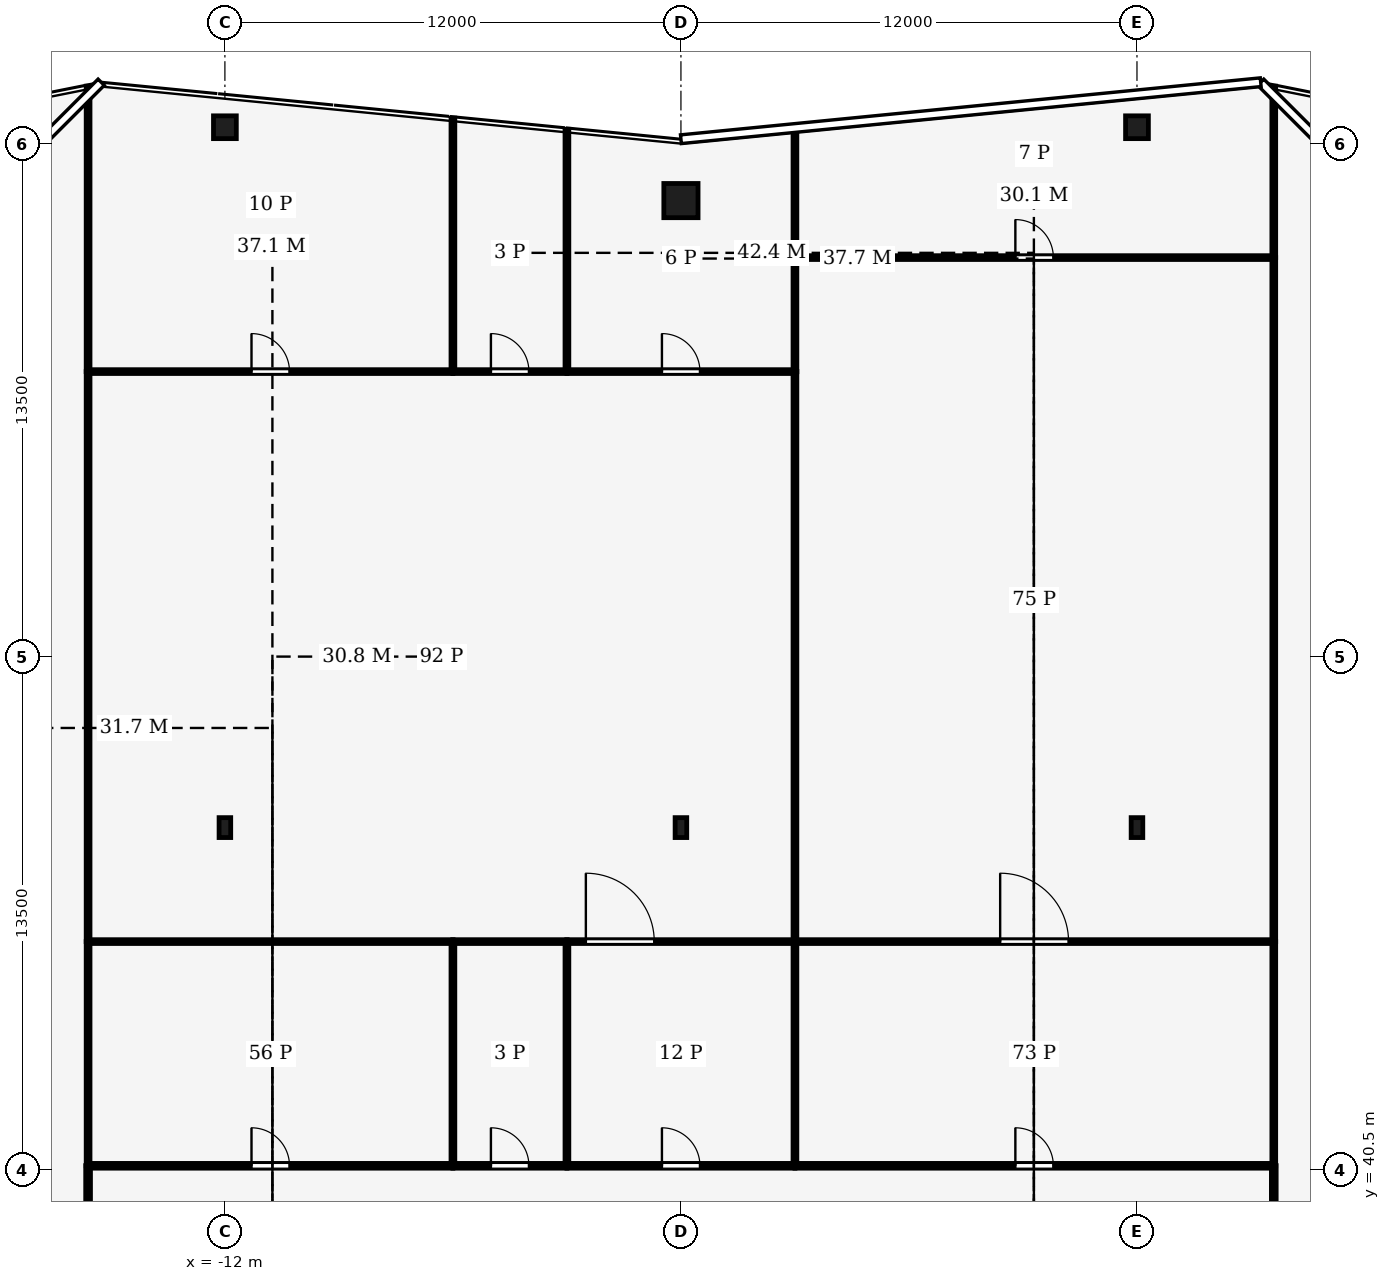
"""IFC4 building model, lengths in metres.
Left out: names, types, materials, properties, quantities, classifications, styles, units other than length and angle.
Written with IfcOpenShell. Run it as: python <this file> out.ifc"""

import sys

from ifc_helpers import new_model, si_unit, direction, frame, frame_2d, origin, origin_2d, place, context, subcontext, project, spatial, rectangle, hollow_rectangle, i_section, extrude, element, fill, save


model = new_model("IFC4")
c1 = context("Model", 3, precision=1e-05, world=origin(), true_north=direction((0.0, 1.0)))
c2 = subcontext(c1, "Body", "Model", "MODEL_VIEW")
j1 = project(units=[si_unit("LENGTHUNIT", "METRE"), si_unit("PLANEANGLEUNIT", "RADIAN")], contexts=[c1])
p1 = place(None, origin())
s1 = spatial("IfcSite", under=j1, at=p1, CompositionType="ELEMENT")
p2 = place(p1, origin())
s2 = spatial("IfcBuilding", under=s1, at=p2, CompositionType="ELEMENT")
p3 = place(p2, frame((0.0, 0.0, 334.0)))
s3 = spatial("IfcBuildingStorey", under=s2, at=p3, CompositionType="ELEMENT", Elevation=334.0)
p4 = place(p3, frame((0.0, 66.0, 0.0), z_axis=(0.0, 0.0, 1.0), x_axis=(1.0, 0.0, 0.0)))
e1 = element("IfcColumn", 1, at=p4, inside=s3, PredefinedType="COLUMN", context=c2, shape_type="SweptSolid", body=[
    extrude(hollow_rectangle(XDim=0.9, YDim=0.9, WallThickness=0.04, at=origin_2d()), origin(), (0.0, 0.0, 1.0), 6.5),
])
for number, where, z_axis, x_axis in (
    (2, (-12.0, 67.93, 0.0), (0.0, 0.0, 1.0), (1.0, 0.0, 0.0)),
    (3, (12.0, 67.93, 0.0), (0.0, 0.0, 1.0), (1.0, 0.0, 0.0)),
):
    element("IfcColumn", number, at=place(p3, frame(where, z_axis=z_axis, x_axis=x_axis)), inside=s3, PredefinedType="COLUMN", context=c2, shape_type="SweptSolid", body=[
        extrude(hollow_rectangle(XDim=0.6, YDim=0.6, WallThickness=0.025, at=origin_2d()), origin(), (0.0, 0.0, 1.0), 6.5),
    ])
for number, where, z_axis, x_axis in (
    (4, (-12.0, 49.5, 0.0), (0.0, 0.0, 1.0), (1.0, 0.0, 0.0)),
    (5, (0.0, 49.5, 0.0), (0.0, 0.0, 1.0), (1.0, 0.0, 0.0)),
    (6, (12.0, 49.5, 0.0), (0.0, 0.0, 1.0), (1.0, 0.0, 0.0)),
):
    element("IfcColumn", number, at=place(p3, frame(where, z_axis=z_axis, x_axis=x_axis)), inside=s3, PredefinedType="COLUMN", context=c2, shape_type="SweptSolid", body=[
        extrude(i_section(OverallWidth=0.306, OverallDepth=0.524, WebThickness=0.012, FlangeThickness=0.04, FilletRadius=0.027, at=origin_2d()), origin(), (0.0, 0.0, 1.0), 6.5),
    ])
p5 = place(p3, frame((-15.6, 37.5, 0.0), z_axis=(0.0, 0.0, 1.0), x_axis=(0.0, 1.0, 0.0)))
e7 = element("IfcWall", 7, at=p5, inside=s3, PredefinedType="PARTITIONING", context=c2, shape_type="SweptSolid", body=[
    extrude(rectangle(XDim=3.104, YDim=0.125, at=frame_2d((1.552, 0.0))), origin(), (0.0, 0.0, 1.0), 5.62),
])
p6 = place(p5, frame((0.252, 0.0, 0.0)))
e8 = element("IfcOpeningElement", 8, at=p6, cuts=e7, PredefinedType="OPENING", context=c2, shape_type="SweptSolid", body=[
    extrude(rectangle(XDim=1.0, YDim=2.1, at=frame_2d((0.5, 1.05))), frame((0.0, 0.073, 0.0), z_axis=(0.0, -1.0, 0.0), x_axis=(1.0, 0.0, 0.0)), (0.0, 0.0, 1.0), 0.145),
])
p7 = place(p3, frame((15.6, 40.604, 0.0), z_axis=(0.0, 0.0, 1.0), x_axis=(0.0, -1.0, 0.0)))
e9 = element("IfcWall", 9, at=p7, inside=s3, PredefinedType="PARTITIONING", context=c2, shape_type="SweptSolid", body=[
    extrude(rectangle(XDim=6.104, YDim=0.125, at=frame_2d((3.052, 0.0))), origin(), (0.0, 0.0, 1.0), 5.62),
])
p8 = place(p7, frame((2.552, 0.0, 0.0)))
e10 = element("IfcOpeningElement", 10, at=p8, cuts=e9, PredefinedType="OPENING", context=c2, shape_type="SweptSolid", body=[
    extrude(rectangle(XDim=1.0, YDim=2.1, at=frame_2d((0.5, 1.05))), frame((0.0, 0.073, 0.0), z_axis=(0.0, -1.0, 0.0), x_axis=(1.0, 0.0, 0.0)), (0.0, 0.0, 1.0), 0.145),
])
p9 = place(p3, frame((-15.6, 40.6, 0.0), z_axis=(0.0, 0.0, 1.0), x_axis=(1.0, 0.0, 0.0)))
e11 = element("IfcWall", 11, at=p9, inside=s3, PredefinedType="PARTITIONING", context=c2, shape_type="SweptSolid", body=[
    extrude(rectangle(XDim=9.6, YDim=0.125, at=frame_2d((4.8, 0.0))), origin(), (0.0, 0.0, 1.0), 5.87),
])
p10 = place(p9, frame((4.3, 0.0, 0.0)))
e12 = element("IfcOpeningElement", 12, at=p10, cuts=e11, PredefinedType="OPENING", context=c2, shape_type="SweptSolid", body=[
    extrude(rectangle(XDim=1.0, YDim=2.1, at=frame_2d((0.5, 1.05))), frame((0.0, 0.073, 0.0), z_axis=(0.0, -1.0, 0.0), x_axis=(1.0, 0.0, 0.0)), (0.0, 0.0, 1.0), 0.145),
])
p11 = place(p3, frame((-6.0, 40.6, 0.0), z_axis=(0.0, 0.0, 1.0), x_axis=(1.0, 0.0, 0.0)))
e13 = element("IfcWall", 13, at=p11, inside=s3, PredefinedType="PARTITIONING", context=c2, shape_type="SweptSolid", body=[
    extrude(rectangle(XDim=3.0, YDim=0.125, at=frame_2d((1.5, 0.0))), origin(), (0.0, 0.0, 1.0), 5.87),
])
p12 = place(p11, frame((1.0, 0.0, 0.0)))
e14 = element("IfcOpeningElement", 14, at=p12, cuts=e13, PredefinedType="OPENING", context=c2, shape_type="SweptSolid", body=[
    extrude(rectangle(XDim=1.0, YDim=2.1, at=frame_2d((0.5, 1.05))), frame((0.0, 0.073, 0.0), z_axis=(0.0, -1.0, 0.0), x_axis=(1.0, 0.0, 0.0)), (0.0, 0.0, 1.0), 0.145),
])
p13 = place(p3, frame((-3.0, 40.6, 0.0), z_axis=(0.0, 0.0, 1.0), x_axis=(1.0, 0.0, 0.0)))
e15 = element("IfcWall", 15, at=p13, inside=s3, PredefinedType="PARTITIONING", context=c2, shape_type="SweptSolid", body=[
    extrude(rectangle(XDim=6.0, YDim=0.125, at=frame_2d((3.0, 0.0))), origin(), (0.0, 0.0, 1.0), 5.87),
])
p14 = place(p13, frame((2.5, 0.0, 0.0)))
e16 = element("IfcOpeningElement", 16, at=p14, cuts=e15, PredefinedType="OPENING", context=c2, shape_type="SweptSolid", body=[
    extrude(rectangle(XDim=1.0, YDim=2.1, at=frame_2d((0.5, 1.05))), frame((0.0, 0.073, 0.0), z_axis=(0.0, -1.0, 0.0), x_axis=(1.0, 0.0, 0.0)), (0.0, 0.0, 1.0), 0.145),
])
p15 = place(p3, frame((3.0, 40.6, 0.0), z_axis=(0.0, 0.0, 1.0), x_axis=(1.0, 0.0, 0.0)))
e17 = element("IfcWall", 17, at=p15, inside=s3, PredefinedType="PARTITIONING", context=c2, shape_type="SweptSolid", body=[
    extrude(rectangle(XDim=12.6, YDim=0.125, at=frame_2d((6.3, 0.0))), origin(), (0.0, 0.0, 1.0), 5.87),
])
p16 = place(p15, frame((5.8, 0.0, 0.0)))
e18 = element("IfcOpeningElement", 18, at=p16, cuts=e17, PredefinedType="OPENING", context=c2, shape_type="SweptSolid", body=[
    extrude(rectangle(XDim=1.0, YDim=2.1, at=frame_2d((0.5, 1.05))), frame((0.0, 0.073, 0.0), z_axis=(0.0, -1.0, 0.0), x_axis=(1.0, 0.0, 0.0)), (0.0, 0.0, 1.0), 0.145),
])
p17 = place(p3, frame((-15.6, 40.6, 0.0), z_axis=(0.0, 0.0, 1.0), x_axis=(0.0, 1.0, 0.0)))
e19 = element("IfcWall", 19, at=p17, inside=s3, PredefinedType="PARTITIONING", context=c2, shape_type="SweptSolid", body=[
    extrude(rectangle(XDim=5.9, YDim=0.1, at=frame_2d((2.95, 0.0))), origin(), (0.0, 0.0, 1.0), 6.35),
])
p18 = place(p3, frame((-15.6, 46.5, 0.0), z_axis=(0.0, 0.0, 1.0), x_axis=(0.0, 1.0, 0.0)))
e20 = element("IfcWall", 20, at=p18, inside=s3, PredefinedType="PARTITIONING", context=c2, shape_type="SweptSolid", body=[
    extrude(rectangle(XDim=15.0, YDim=0.1, at=frame_2d((7.5, 0.0))), origin(), (0.0, 0.0, 1.0), 5.83),
])
p19 = place(p3, frame((-15.6, 61.5, 0.0), z_axis=(0.0, 0.0, 1.0), x_axis=(0.0, 1.0, 0.0)))
e21 = element("IfcWall", 21, at=p19, inside=s3, PredefinedType="PARTITIONING", context=c2, shape_type="SweptSolid", body=[
    extrude(rectangle(XDim=7.51, YDim=0.1, at=frame_2d((3.755, 0.0))), origin(), (0.0, 0.0, 1.0), 5.41),
])
p20 = place(p3, frame((15.6, 46.5, 0.0), z_axis=(0.0, 0.0, 1.0), x_axis=(0.0, -1.0, 0.0)))
e22 = element("IfcWall", 22, at=p20, inside=s3, PredefinedType="PARTITIONING", context=c2, shape_type="SweptSolid", body=[
    extrude(rectangle(XDim=5.9, YDim=0.1, at=frame_2d((2.95, 0.0))), origin(), (0.0, 0.0, 1.0), 6.35),
])
p21 = place(p3, frame((15.6, 64.5, 0.0), z_axis=(0.0, 0.0, 1.0), x_axis=(0.0, -1.0, 0.0)))
e23 = element("IfcWall", 23, at=p21, inside=s3, PredefinedType="PARTITIONING", context=c2, shape_type="SweptSolid", body=[
    extrude(rectangle(XDim=18.0, YDim=0.1, at=frame_2d((9.0, 0.0))), origin(), (0.0, 0.0, 1.0), 5.83),
])
p22 = place(p3, frame((15.6, 69.01, 0.0), z_axis=(0.0, 0.0, 1.0), x_axis=(0.0, -1.0, 0.0)))
e24 = element("IfcWall", 24, at=p22, inside=s3, PredefinedType="PARTITIONING", context=c2, shape_type="SweptSolid", body=[
    extrude(rectangle(XDim=4.51, YDim=0.1, at=frame_2d((2.255, 0.0))), origin(), (0.0, 0.0, 1.0), 5.41),
])
p23 = place(p3, frame((-6.0, 40.6, 0.0), z_axis=(0.0, 0.0, 1.0), x_axis=(0.0, 1.0, 0.0)))
e25 = element("IfcWall", 25, at=p23, inside=s3, PredefinedType="PARTITIONING", context=c2, shape_type="SweptSolid", body=[
    extrude(rectangle(XDim=5.9, YDim=0.1, at=frame_2d((2.95, 0.0))), origin(), (0.0, 0.0, 1.0), 6.35),
])
p24 = place(p3, frame((-5.996, 46.5, 0.0), z_axis=(0.0, 0.0, 1.0), x_axis=(-1.0, 0.0, 0.0)))
e26 = element("IfcWall", 26, at=p24, inside=s3, PredefinedType="PARTITIONING", context=c2, shape_type="SweptSolid", body=[
    extrude(rectangle(XDim=9.604, YDim=0.1, at=frame_2d((4.802, 0.0))), origin(), (0.0, 0.0, 1.0), 5.87),
])
p25 = place(p3, frame((-3.0, 40.6, 0.0), z_axis=(0.0, 0.0, 1.0), x_axis=(0.0, 1.0, 0.0)))
e27 = element("IfcWall", 27, at=p25, inside=s3, PredefinedType="PARTITIONING", context=c2, shape_type="SweptSolid", body=[
    extrude(rectangle(XDim=5.9, YDim=0.1, at=frame_2d((2.95, 0.0))), origin(), (0.0, 0.0, 1.0), 6.35),
])
p26 = place(p3, frame((-2.996, 46.5, 0.0), z_axis=(0.0, 0.0, 1.0), x_axis=(-1.0, 0.0, 0.0)))
e28 = element("IfcWall", 28, at=p26, inside=s3, PredefinedType="PARTITIONING", context=c2, shape_type="SweptSolid", body=[
    extrude(rectangle(XDim=3.008, YDim=0.1, at=frame_2d((1.504, 0.0))), origin(), (0.0, 0.0, 1.0), 5.87),
])
p27 = place(p3, frame((-3.004, 46.5, 0.0), z_axis=(0.0, 0.0, 1.0), x_axis=(1.0, 0.0, 0.0)))
e29 = element("IfcWall", 29, at=p27, inside=s3, PredefinedType="PARTITIONING", context=c2, shape_type="SweptSolid", body=[
    extrude(rectangle(XDim=6.004, YDim=0.1, at=frame_2d((3.002, 0.0))), origin(), (0.0, 0.0, 1.0), 5.87),
])
p28 = place(p27, frame((0.502, 0.0, 0.0)))
e30 = element("IfcOpeningElement", 30, at=p28, cuts=e29, PredefinedType="OPENING", context=c2, shape_type="SweptSolid", body=[
    extrude(rectangle(XDim=1.8, YDim=2.1, at=frame_2d((0.9, 1.05))), frame((0.0, 0.06, 0.0), z_axis=(0.0, -1.0, 0.0), x_axis=(1.0, 0.0, 0.0)), (0.0, 0.0, 1.0), 0.12),
])
p29 = place(p3, frame((3.0, 40.6, 0.0), z_axis=(0.0, 0.0, 1.0), x_axis=(0.0, 1.0, 0.0)))
e31 = element("IfcWall", 31, at=p29, inside=s3, PredefinedType="PARTITIONING", context=c2, shape_type="SweptSolid", body=[
    extrude(rectangle(XDim=5.9, YDim=0.1, at=frame_2d((2.95, 0.0))), origin(), (0.0, 0.0, 1.0), 6.35),
])
p30 = place(p3, frame((-15.6, 61.5, 0.0), z_axis=(0.0, 0.0, 1.0), x_axis=(1.0, 0.0, 0.0)))
e32 = element("IfcWall", 32, at=p30, inside=s3, PredefinedType="PARTITIONING", context=c2, shape_type="SweptSolid", body=[
    extrude(rectangle(XDim=9.6, YDim=0.1, at=frame_2d((4.8, 0.0))), origin(), (0.0, 0.0, 1.0), 5.72),
])
p31 = place(p30, frame((4.3, 0.0, 0.0)))
e33 = element("IfcOpeningElement", 33, at=p31, cuts=e32, PredefinedType="OPENING", context=c2, shape_type="SweptSolid", body=[
    extrude(rectangle(XDim=1.0, YDim=2.1, at=frame_2d((0.5, 1.05))), frame((0.0, 0.06, 0.0), z_axis=(0.0, -1.0, 0.0), x_axis=(1.0, 0.0, 0.0)), (0.0, 0.0, 1.0), 0.12),
])
p32 = place(p3, frame((-6.0, 61.5, 0.0), z_axis=(0.0, 0.0, 1.0), x_axis=(1.0, 0.0, 0.0)))
e34 = element("IfcWall", 34, at=p32, inside=s3, PredefinedType="PARTITIONING", context=c2, shape_type="SweptSolid", body=[
    extrude(rectangle(XDim=3.0, YDim=0.1, at=frame_2d((1.5, 0.0))), origin(), (0.0, 0.0, 1.0), 5.72),
])
p33 = place(p32, frame((1.0, 0.0, 0.0)))
e35 = element("IfcOpeningElement", 35, at=p33, cuts=e34, PredefinedType="OPENING", context=c2, shape_type="SweptSolid", body=[
    extrude(rectangle(XDim=1.0, YDim=2.1, at=frame_2d((0.5, 1.05))), frame((0.0, 0.06, 0.0), z_axis=(0.0, -1.0, 0.0), x_axis=(1.0, 0.0, 0.0)), (0.0, 0.0, 1.0), 0.12),
])
p34 = place(p3, frame((-3.0, 61.5, 0.0), z_axis=(0.0, 0.0, 1.0), x_axis=(1.0, 0.0, 0.0)))
e36 = element("IfcWall", 36, at=p34, inside=s3, PredefinedType="PARTITIONING", context=c2, shape_type="SweptSolid", body=[
    extrude(rectangle(XDim=6.0, YDim=0.1, at=frame_2d((3.0, 0.0))), origin(), (0.0, 0.0, 1.0), 5.77),
])
p35 = place(p34, frame((2.5, 0.0, 0.0)))
e37 = element("IfcOpeningElement", 37, at=p35, cuts=e36, PredefinedType="OPENING", context=c2, shape_type="SweptSolid", body=[
    extrude(rectangle(XDim=1.0, YDim=2.1, at=frame_2d((0.5, 1.05))), frame((0.0, 0.06, 0.0), z_axis=(0.0, -1.0, 0.0), x_axis=(1.0, 0.0, 0.0)), (0.0, 0.0, 1.0), 0.12),
])
p36 = place(p3, frame((3.0, 46.5, 0.0), z_axis=(0.0, 0.0, 1.0), x_axis=(0.0, 1.0, 0.0)))
e38 = element("IfcWall", 38, at=p36, inside=s3, PredefinedType="PARTITIONING", context=c2, shape_type="SweptSolid", body=[
    extrude(rectangle(XDim=15.004, YDim=0.1, at=frame_2d((7.502, 0.0))), origin(), (0.0, 0.0, 1.0), 5.72),
])
p37 = place(p3, frame((-6.0, 61.5, 0.0), z_axis=(0.0, 0.0, 1.0), x_axis=(0.0, 1.0, 0.0)))
e39 = element("IfcWall", 39, at=p37, inside=s3, PredefinedType="PARTITIONING", context=c2, shape_type="SweptSolid", body=[
    extrude(rectangle(XDim=6.67, YDim=0.1, at=frame_2d((3.335, 0.0))), origin(), (0.0, 0.0, 1.0), 5.52),
])
p38 = place(p3, frame((-3.0, 61.5, 0.0), z_axis=(0.0, 0.0, 1.0), x_axis=(0.0, 1.0, 0.0)))
e40 = element("IfcWall", 40, at=p38, inside=s3, PredefinedType="PARTITIONING", context=c2, shape_type="SweptSolid", body=[
    extrude(rectangle(XDim=6.375, YDim=0.1, at=frame_2d((3.188, 0.0))), origin(), (0.0, 0.0, 1.0), 5.52),
])
p39 = place(p3, frame((3.0, 61.496, 0.0), z_axis=(0.0, 0.0, 1.0), x_axis=(0.0, 1.0, 0.0)))
e41 = element("IfcWall", 41, at=p39, inside=s3, PredefinedType="PARTITIONING", context=c2, shape_type="SweptSolid", body=[
    extrude(rectangle(XDim=3.004, YDim=0.1, at=frame_2d((1.502, 0.0))), origin(), (0.0, 0.0, 1.0), 6.35),
])
p40 = place(p3, frame((3.0, 64.5, 0.0), z_axis=(0.0, 0.0, 1.0), x_axis=(0.0, 1.0, 0.0)))
e42 = element("IfcWall", 42, at=p40, inside=s3, PredefinedType="PARTITIONING", context=c2, shape_type="SweptSolid", body=[
    extrude(rectangle(XDim=3.375, YDim=0.1, at=frame_2d((1.688, 0.0))), origin(), (0.0, 0.0, 1.0), 5.52),
])
p41 = place(p3, frame((3.0, 46.5, 0.0), z_axis=(0.0, 0.0, 1.0), x_axis=(1.0, 0.0, 0.0)))
e43 = element("IfcWall", 43, at=p41, inside=s3, PredefinedType="PARTITIONING", context=c2, shape_type="SweptSolid", body=[
    extrude(rectangle(XDim=12.6, YDim=0.1, at=frame_2d((6.3, 0.0))), origin(), (0.0, 0.0, 1.0), 5.87),
])
p42 = place(p41, frame((5.4, 0.0, 0.0)))
e44 = element("IfcOpeningElement", 44, at=p42, cuts=e43, PredefinedType="OPENING", context=c2, shape_type="SweptSolid", body=[
    extrude(rectangle(XDim=1.8, YDim=2.1, at=frame_2d((0.9, 1.05))), frame((0.0, 0.06, 0.0), z_axis=(0.0, -1.0, 0.0), x_axis=(1.0, 0.0, 0.0)), (0.0, 0.0, 1.0), 0.12),
])
p43 = place(p3, frame((3.0, 64.5, 0.0), z_axis=(0.0, 0.0, 1.0), x_axis=(1.0, 0.0, 0.0)))
e45 = element("IfcWall", 45, at=p43, inside=s3, PredefinedType="PARTITIONING", context=c2, shape_type="SweptSolid", body=[
    extrude(rectangle(XDim=12.6, YDim=0.1, at=frame_2d((6.3, 0.0))), origin(), (0.0, 0.0, 1.0), 5.72),
])
p44 = place(p43, frame((5.8, 0.0, 0.0)))
e46 = element("IfcOpeningElement", 46, at=p44, cuts=e45, PredefinedType="OPENING", context=c2, shape_type="SweptSolid", body=[
    extrude(rectangle(XDim=1.0, YDim=2.1, at=frame_2d((0.5, 1.05))), frame((0.0, 0.06, 0.0), z_axis=(0.0, -1.0, 0.0), x_axis=(1.0, 0.0, 0.0)), (0.0, 0.0, 1.0), 0.12),
])
p45 = place(p10, origin())
e47 = element("IfcDoor", 47, at=p45, inside=s3, OperationType="SINGLE_SWING_LEFT", PredefinedType="DOOR", context=c2, shape_type="SweptSolid", body=[
    extrude(rectangle(XDim=1.0, YDim=2.1, at=frame_2d((0.5, 1.05))), frame((0.0, 0.025, 0.0), z_axis=(0.0, -1.0, 0.0), x_axis=(1.0, 0.0, 0.0)), (0.0, 0.0, 1.0), 0.05),
])
fill(e12, e47)
p46 = place(p12, origin())
e48 = element("IfcDoor", 48, at=p46, inside=s3, OperationType="SINGLE_SWING_RIGHT", PredefinedType="DOOR", context=c2, shape_type="SweptSolid", body=[
    extrude(rectangle(XDim=1.0, YDim=2.1, at=frame_2d((0.5, 1.05))), frame((0.0, 0.025, 0.0), z_axis=(0.0, -1.0, 0.0), x_axis=(1.0, 0.0, 0.0)), (0.0, 0.0, 1.0), 0.05),
])
fill(e14, e48)
p47 = place(p14, origin())
e49 = element("IfcDoor", 49, at=p47, inside=s3, OperationType="SINGLE_SWING_LEFT", PredefinedType="DOOR", context=c2, shape_type="SweptSolid", body=[
    extrude(rectangle(XDim=1.0, YDim=2.1, at=frame_2d((0.5, 1.05))), frame((0.0, 0.025, 0.0), z_axis=(0.0, -1.0, 0.0), x_axis=(1.0, 0.0, 0.0)), (0.0, 0.0, 1.0), 0.05),
])
fill(e16, e49)
p48 = place(p16, origin())
e50 = element("IfcDoor", 50, at=p48, inside=s3, OperationType="SINGLE_SWING_RIGHT", PredefinedType="DOOR", context=c2, shape_type="SweptSolid", body=[
    extrude(rectangle(XDim=1.0, YDim=2.1, at=frame_2d((0.5, 1.05))), frame((0.0, 0.025, 0.0), z_axis=(0.0, -1.0, 0.0), x_axis=(1.0, 0.0, 0.0)), (0.0, 0.0, 1.0), 0.05),
])
fill(e18, e50)
p49 = place(p28, origin())
e51 = element("IfcDoor", 51, at=p49, inside=s3, OperationType="DOUBLE_DOOR_SINGLE_SWING", PredefinedType="DOOR", context=c2, shape_type="SweptSolid", body=[
    extrude(rectangle(XDim=1.8, YDim=2.1, at=frame_2d((0.9, 1.05))), frame((0.0, 0.025, 0.0), z_axis=(0.0, -1.0, 0.0), x_axis=(1.0, 0.0, 0.0)), (0.0, 0.0, 1.0), 0.05),
])
fill(e30, e51)
p50 = place(p31, origin())
e52 = element("IfcDoor", 52, at=p50, inside=s3, OperationType="SINGLE_SWING_RIGHT", PredefinedType="DOOR", context=c2, shape_type="SweptSolid", body=[
    extrude(rectangle(XDim=1.0, YDim=2.1, at=frame_2d((0.5, 1.05))), frame((0.0, 0.025, 0.0), z_axis=(0.0, -1.0, 0.0), x_axis=(1.0, 0.0, 0.0)), (0.0, 0.0, 1.0), 0.05),
])
fill(e33, e52)
p51 = place(p33, origin())
e53 = element("IfcDoor", 53, at=p51, inside=s3, OperationType="SINGLE_SWING_LEFT", PredefinedType="DOOR", context=c2, shape_type="SweptSolid", body=[
    extrude(rectangle(XDim=1.0, YDim=2.1, at=frame_2d((0.5, 1.05))), frame((0.0, 0.025, 0.0), z_axis=(0.0, -1.0, 0.0), x_axis=(1.0, 0.0, 0.0)), (0.0, 0.0, 1.0), 0.05),
])
fill(e35, e53)
p52 = place(p35, origin())
e54 = element("IfcDoor", 54, at=p52, inside=s3, OperationType="SINGLE_SWING_RIGHT", PredefinedType="DOOR", context=c2, shape_type="SweptSolid", body=[
    extrude(rectangle(XDim=1.0, YDim=2.1, at=frame_2d((0.5, 1.05))), frame((0.0, 0.025, 0.0), z_axis=(0.0, -1.0, 0.0), x_axis=(1.0, 0.0, 0.0)), (0.0, 0.0, 1.0), 0.05),
])
fill(e37, e54)
p53 = place(p42, origin())
e55 = element("IfcDoor", 55, at=p53, inside=s3, OperationType="DOUBLE_DOOR_SINGLE_SWING", PredefinedType="DOOR", context=c2, shape_type="SweptSolid", body=[
    extrude(rectangle(XDim=1.8, YDim=2.1, at=frame_2d((0.9, 1.05))), frame((0.0, 0.025, 0.0), z_axis=(0.0, -1.0, 0.0), x_axis=(1.0, 0.0, 0.0)), (0.0, 0.0, 1.0), 0.05),
])
fill(e44, e55)
p54 = place(p44, origin())
e56 = element("IfcDoor", 56, at=p54, inside=s3, OperationType="SINGLE_SWING_RIGHT", PredefinedType="DOOR", context=c2, shape_type="SweptSolid", body=[
    extrude(rectangle(XDim=1.0, YDim=2.1, at=frame_2d((0.5, 1.05))), frame((0.0, 0.025, 0.0), z_axis=(0.0, -1.0, 0.0), x_axis=(1.0, 0.0, 0.0)), (0.0, 0.0, 1.0), 0.05),
])
fill(e46, e56)
save(model, sys.argv[1])
